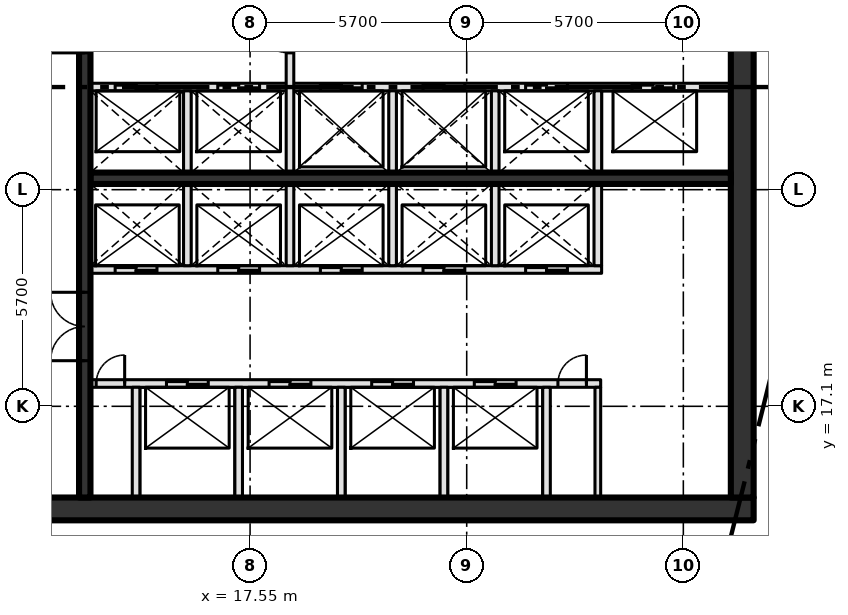
"""IFC4 building model, lengths in metres.
Left out: names, types, materials, properties, quantities, classifications, styles, units other than length and angle.
Written with IfcOpenShell. Run it as: python <this file> out.ifc"""

import sys

from ifc_helpers import new_model, si_unit, direction, frame, frame_2d, origin, place, context, subcontext, project, spatial, rectangle, extrude, element, fill, save


model = new_model("IFC4")
c1 = context("Model", 3, precision=1e-05, world=origin(), true_north=direction((0.0, 1.0)))
c2 = subcontext(c1, "Body", "Model", "MODEL_VIEW")
j1 = project(units=[si_unit("LENGTHUNIT", "METRE"), si_unit("PLANEANGLEUNIT", "RADIAN")], contexts=[c1])
p1 = place(None, origin())
s1 = spatial("IfcSite", under=j1, at=p1, CompositionType="ELEMENT")
p2 = place(p1, origin())
s2 = spatial("IfcBuilding", under=s1, at=p2, CompositionType="ELEMENT")
p3 = place(p2, frame((0.0, 0.0, 284.4)))
s3 = spatial("IfcBuildingStorey", under=s2, at=p3, CompositionType="ELEMENT", Elevation=284.4)
p4 = place(p3, frame((8.0, 14.4, -0.45), z_axis=(0.0, 0.0, 1.0), x_axis=(1.0, 0.0, 0.0)))
e1 = element("IfcWall", 1, at=p4, inside=s3, PredefinedType="SHEAR", context=c2, shape_type="SweptSolid", body=[
    extrude(rectangle(XDim=22.8, YDim=0.6, at=frame_2d((11.4, 0.0))), origin(), (0.0, 0.0, 1.0), 5.55),
])
p5 = place(p4, frame((2.3, 0.0, 0.45)))
e2 = element("IfcOpeningElement", 2, at=p5, cuts=e1, PredefinedType="OPENING", context=c2, shape_type="SweptSolid", body=[
    extrude(rectangle(XDim=1.8, YDim=2.1, at=frame_2d((0.9, 1.05))), frame((0.0, 0.31, 0.0), z_axis=(0.0, -1.0, 0.0), x_axis=(1.0, 0.0, 0.0)), (0.0, 0.0, 1.0), 0.62),
])
p6 = place(p3, frame((30.5, 14.7, -0.45), z_axis=(0.0, 0.0, 1.0), x_axis=(0.0, 1.0, 0.0)))
e3 = element("IfcWall", 3, at=p6, inside=s3, PredefinedType="SHEAR", context=c2, shape_type="SweptSolid", body=[
    extrude(rectangle(XDim=21.0, YDim=0.6, at=frame_2d((10.5, 0.0))), origin(), (0.0, 0.0, 1.0), 5.55),
])
p7 = place(p3, frame((13.35, 17.7, 0.0), z_axis=(0.0, 0.0, 1.0), x_axis=(1.0, 0.0, 0.0)))
e4 = element("IfcWall", 4, at=p7, inside=s3, PredefinedType="SOLIDWALL", context=c2, shape_type="SweptSolid", body=[
    extrude(rectangle(XDim=13.425, YDim=0.2, at=frame_2d((6.712, 0.0))), origin(), (0.0, 0.0, 1.0), 5.1),
])
p8 = place(p7, frame((2.0, 0.0, 0.0)))
e5 = element("IfcOpeningElement", 5, at=p8, cuts=e4, PredefinedType="OPENING", context=c2, shape_type="SweptSolid", body=[
    extrude(rectangle(XDim=1.1, YDim=2.1, at=frame_2d((0.55, 1.05))), frame((0.0, 0.11, 0.0), z_axis=(0.0, -1.0, 0.0), x_axis=(1.0, 0.0, 0.0)), (0.0, 0.0, 1.0), 0.22),
])
p9 = place(p7, frame((4.7, 0.0, 0.0)))
e6 = element("IfcOpeningElement", 6, at=p9, cuts=e4, PredefinedType="OPENING", context=c2, shape_type="SweptSolid", body=[
    extrude(rectangle(XDim=1.1, YDim=2.1, at=frame_2d((0.55, 1.05))), frame((0.0, 0.11, 0.0), z_axis=(0.0, -1.0, 0.0), x_axis=(1.0, 0.0, 0.0)), (0.0, 0.0, 1.0), 0.22),
])
p10 = place(p7, frame((7.4, 0.0, 0.0)))
e7 = element("IfcOpeningElement", 7, at=p10, cuts=e4, PredefinedType="OPENING", context=c2, shape_type="SweptSolid", body=[
    extrude(rectangle(XDim=1.1, YDim=2.1, at=frame_2d((0.55, 1.05))), frame((0.0, 0.11, 0.0), z_axis=(0.0, -1.0, 0.0), x_axis=(1.0, 0.0, 0.0)), (0.0, 0.0, 1.0), 0.22),
])
p11 = place(p7, frame((10.1, 0.0, 0.0)))
e8 = element("IfcOpeningElement", 8, at=p11, cuts=e4, PredefinedType="OPENING", context=c2, shape_type="SweptSolid", body=[
    extrude(rectangle(XDim=1.1, YDim=2.1, at=frame_2d((0.55, 1.05))), frame((0.0, 0.11, 0.0), z_axis=(0.0, -1.0, 0.0), x_axis=(1.0, 0.0, 0.0)), (0.0, 0.0, 1.0), 0.22),
])
p12 = place(p7, frame((0.15, 0.0, 0.0)))
e9 = element("IfcOpeningElement", 9, at=p12, cuts=e4, PredefinedType="OPENING", context=c2, shape_type="SweptSolid", body=[
    extrude(rectangle(XDim=0.75, YDim=2.1, at=frame_2d((0.375, 1.05))), frame((0.0, 0.11, 0.0), z_axis=(0.0, -1.0, 0.0), x_axis=(1.0, 0.0, 0.0)), (0.0, 0.0, 1.0), 0.22),
])
p13 = place(p7, frame((12.3, 0.0, 0.0)))
e10 = element("IfcOpeningElement", 10, at=p13, cuts=e4, PredefinedType="OPENING", context=c2, shape_type="SweptSolid", body=[
    extrude(rectangle(XDim=0.75, YDim=2.1, at=frame_2d((0.375, 1.05))), frame((0.0, 0.11, 0.0), z_axis=(0.0, -1.0, 0.0), x_axis=(1.0, 0.0, 0.0)), (0.0, 0.0, 1.0), 0.22),
])
p14 = place(p3, frame((13.35, 20.7, 0.0), z_axis=(0.0, 0.0, 1.0), x_axis=(1.0, 0.0, 0.0)))
e11 = element("IfcWall", 11, at=p14, inside=s3, PredefinedType="SOLIDWALL", context=c2, shape_type="SweptSolid", body=[
    extrude(rectangle(XDim=13.45, YDim=0.2, at=frame_2d((6.725, 0.0))), origin(), (0.0, 0.0, 1.0), 5.1),
])
p15 = place(p14, frame((0.65, 0.0, 0.0)))
e12 = element("IfcOpeningElement", 12, at=p15, cuts=e11, PredefinedType="OPENING", context=c2, shape_type="SweptSolid", body=[
    extrude(rectangle(XDim=1.1, YDim=2.1, at=frame_2d((0.55, 1.05))), frame((0.0, 0.11, 0.0), z_axis=(0.0, -1.0, 0.0), x_axis=(1.0, 0.0, 0.0)), (0.0, 0.0, 1.0), 0.22),
])
p16 = place(p14, frame((3.35, 0.0, 0.0)))
e13 = element("IfcOpeningElement", 13, at=p16, cuts=e11, PredefinedType="OPENING", context=c2, shape_type="SweptSolid", body=[
    extrude(rectangle(XDim=1.1, YDim=2.1, at=frame_2d((0.55, 1.05))), frame((0.0, 0.11, 0.0), z_axis=(0.0, -1.0, 0.0), x_axis=(1.0, 0.0, 0.0)), (0.0, 0.0, 1.0), 0.22),
])
p17 = place(p14, frame((6.05, 0.0, 0.0)))
e14 = element("IfcOpeningElement", 14, at=p17, cuts=e11, PredefinedType="OPENING", context=c2, shape_type="SweptSolid", body=[
    extrude(rectangle(XDim=1.1, YDim=2.1, at=frame_2d((0.55, 1.05))), frame((0.0, 0.11, 0.0), z_axis=(0.0, -1.0, 0.0), x_axis=(1.0, 0.0, 0.0)), (0.0, 0.0, 1.0), 0.22),
])
p18 = place(p14, frame((8.75, 0.0, 0.0)))
e15 = element("IfcOpeningElement", 15, at=p18, cuts=e11, PredefinedType="OPENING", context=c2, shape_type="SweptSolid", body=[
    extrude(rectangle(XDim=1.1, YDim=2.1, at=frame_2d((0.55, 1.05))), frame((0.0, 0.11, 0.0), z_axis=(0.0, -1.0, 0.0), x_axis=(1.0, 0.0, 0.0)), (0.0, 0.0, 1.0), 0.22),
])
p19 = place(p14, frame((11.45, 0.0, 0.0)))
e16 = element("IfcOpeningElement", 16, at=p19, cuts=e11, PredefinedType="OPENING", context=c2, shape_type="SweptSolid", body=[
    extrude(rectangle(XDim=1.1, YDim=2.1, at=frame_2d((0.55, 1.05))), frame((0.0, 0.11, 0.0), z_axis=(0.0, -1.0, 0.0), x_axis=(1.0, 0.0, 0.0)), (0.0, 0.0, 1.0), 0.22),
])
p20 = place(p3, frame((13.35, 23.1, 0.0), z_axis=(0.0, 0.0, 1.0), x_axis=(1.0, 0.0, 0.0)))
e17 = element("IfcWall", 17, at=p20, inside=s3, PredefinedType="SHEAR", context=c2, shape_type="SweptSolid", body=[
    extrude(rectangle(XDim=16.85, YDim=0.3, at=frame_2d((8.425, 0.0))), origin(), (0.0, 0.0, 1.0), 5.1),
])
p21 = place(p3, frame((13.35, 25.5, 0.0), z_axis=(0.0, 0.0, 1.0), x_axis=(1.0, 0.0, 0.0)))
e18 = element("IfcWall", 18, at=p21, inside=s3, PredefinedType="SOLIDWALL", context=c2, shape_type="SweptSolid", body=[
    extrude(rectangle(XDim=16.85, YDim=0.2, at=frame_2d((8.425, 0.0))), origin(), (0.0, 0.0, 1.0), 5.1),
])
p22 = place(p21, frame((0.65, 0.0, 0.0)))
e19 = element("IfcOpeningElement", 19, at=p22, cuts=e18, PredefinedType="OPENING", context=c2, shape_type="SweptSolid", body=[
    extrude(rectangle(XDim=1.1, YDim=2.1, at=frame_2d((0.55, 1.05))), frame((0.0, 0.11, 0.0), z_axis=(0.0, -1.0, 0.0), x_axis=(1.0, 0.0, 0.0)), (0.0, 0.0, 1.0), 0.22),
])
p23 = place(p21, frame((3.35, 0.0, 0.0)))
e20 = element("IfcOpeningElement", 20, at=p23, cuts=e18, PredefinedType="OPENING", context=c2, shape_type="SweptSolid", body=[
    extrude(rectangle(XDim=1.1, YDim=2.1, at=frame_2d((0.55, 1.05))), frame((0.0, 0.11, 0.0), z_axis=(0.0, -1.0, 0.0), x_axis=(1.0, 0.0, 0.0)), (0.0, 0.0, 1.0), 0.22),
])
p24 = place(p21, frame((6.05, 0.0, 0.0)))
e21 = element("IfcOpeningElement", 21, at=p24, cuts=e18, PredefinedType="OPENING", context=c2, shape_type="SweptSolid", body=[
    extrude(rectangle(XDim=1.1, YDim=2.1, at=frame_2d((0.55, 1.05))), frame((0.0, 0.11, 0.0), z_axis=(0.0, -1.0, 0.0), x_axis=(1.0, 0.0, 0.0)), (0.0, 0.0, 1.0), 0.22),
])
p25 = place(p21, frame((8.75, 0.0, 0.0)))
e22 = element("IfcOpeningElement", 22, at=p25, cuts=e18, PredefinedType="OPENING", context=c2, shape_type="SweptSolid", body=[
    extrude(rectangle(XDim=1.1, YDim=2.1, at=frame_2d((0.55, 1.05))), frame((0.0, 0.11, 0.0), z_axis=(0.0, -1.0, 0.0), x_axis=(1.0, 0.0, 0.0)), (0.0, 0.0, 1.0), 0.22),
])
p26 = place(p21, frame((11.45, 0.0, 0.0)))
e23 = element("IfcOpeningElement", 23, at=p26, cuts=e18, PredefinedType="OPENING", context=c2, shape_type="SweptSolid", body=[
    extrude(rectangle(XDim=1.1, YDim=2.1, at=frame_2d((0.55, 1.05))), frame((0.0, 0.11, 0.0), z_axis=(0.0, -1.0, 0.0), x_axis=(1.0, 0.0, 0.0)), (0.0, 0.0, 1.0), 0.22),
])
p27 = place(p21, frame((14.25, 0.0, 0.0)))
e24 = element("IfcOpeningElement", 24, at=p27, cuts=e18, PredefinedType="OPENING", context=c2, shape_type="SweptSolid", body=[
    extrude(rectangle(XDim=1.1, YDim=2.1, at=frame_2d((0.55, 1.05))), frame((0.0, 0.11, 0.0), z_axis=(0.0, -1.0, 0.0), x_axis=(1.0, 0.0, 0.0)), (0.0, 0.0, 1.0), 0.22),
])
p28 = place(p3, frame((13.2, 14.7, 0.0), z_axis=(0.0, 0.0, 1.0), x_axis=(0.0, 1.0, 0.0)))
e25 = element("IfcWall", 25, at=p28, inside=s3, PredefinedType="SHEAR", context=c2, shape_type="SweptSolid", body=[
    extrude(rectangle(XDim=21.0, YDim=0.3, at=frame_2d((10.5, 0.0))), origin(), (0.0, 0.0, 1.0), 5.1),
])
p29 = place(p28, frame((3.6, 0.0, 0.0)))
e26 = element("IfcOpeningElement", 26, at=p29, cuts=e25, PredefinedType="OPENING", context=c2, shape_type="SweptSolid", body=[
    extrude(rectangle(XDim=1.8, YDim=2.1, at=frame_2d((0.9, 1.05))), frame((0.0, 0.16, 0.0), z_axis=(0.0, -1.0, 0.0), x_axis=(1.0, 0.0, 0.0)), (0.0, 0.0, 1.0), 0.32),
])
p30 = place(p28, frame((11.7, 0.0, 0.0)))
e27 = element("IfcOpeningElement", 27, at=p30, cuts=e25, PredefinedType="OPENING", context=c2, shape_type="SweptSolid", body=[
    extrude(rectangle(XDim=1.2, YDim=2.1, at=frame_2d((0.6, 1.05))), frame((0.0, 0.16, 0.0), z_axis=(0.0, -1.0, 0.0), x_axis=(1.0, 0.0, 0.0)), (0.0, 0.0, 1.0), 0.32),
])
p31 = place(p3, frame((14.55, 14.7, 0.0), z_axis=(0.0, 0.0, 1.0), x_axis=(0.0, 1.0, 0.0)))
e28 = element("IfcWall", 28, at=p31, inside=s3, PredefinedType="SOLIDWALL", context=c2, shape_type="SweptSolid", body=[
    extrude(rectangle(XDim=2.9, YDim=0.2, at=frame_2d((1.45, 0.0))), origin(), (0.0, 0.0, 1.0), 5.1),
])
p32 = place(p3, frame((15.9, 20.8, 0.0), z_axis=(0.0, 0.0, 1.0), x_axis=(0.0, 1.0, 0.0)))
e29 = element("IfcWall", 29, at=p32, inside=s3, PredefinedType="SOLIDWALL", context=c2, shape_type="SweptSolid", body=[
    extrude(rectangle(XDim=4.6, YDim=0.2, at=frame_2d((2.3, 0.0))), origin(), (0.0, 0.0, 1.0), 5.1),
])
p33 = place(p3, frame((17.25, 14.7, 0.0), z_axis=(0.0, 0.0, 1.0), x_axis=(0.0, 1.0, 0.0)))
e30 = element("IfcWall", 30, at=p33, inside=s3, PredefinedType="SOLIDWALL", context=c2, shape_type="SweptSolid", body=[
    extrude(rectangle(XDim=2.9, YDim=0.2, at=frame_2d((1.45, 0.0))), origin(), (0.0, 0.0, 1.0), 5.1),
])
p34 = place(p3, frame((18.6, 20.8, 0.0), z_axis=(0.0, 0.0, 1.0), x_axis=(0.0, 1.0, 0.0)))
e31 = element("IfcWall", 31, at=p34, inside=s3, PredefinedType="SOLIDWALL", context=c2, shape_type="SweptSolid", body=[
    extrude(rectangle(XDim=7.6, YDim=0.2, at=frame_2d((3.8, 0.0))), origin(), (0.0, 0.0, 1.0), 5.1),
])
p35 = place(p34, frame((5.6, 0.0, 0.0)))
e32 = element("IfcOpeningElement", 32, at=p35, cuts=e31, PredefinedType="OPENING", context=c2, shape_type="SweptSolid", body=[
    extrude(rectangle(XDim=1.2, YDim=2.1, at=frame_2d((0.6, 1.05))), frame((0.0, 0.11, 0.0), z_axis=(0.0, -1.0, 0.0), x_axis=(1.0, 0.0, 0.0)), (0.0, 0.0, 1.0), 0.22),
])
p36 = place(p3, frame((19.95, 14.7, 0.0), z_axis=(0.0, 0.0, 1.0), x_axis=(0.0, 1.0, 0.0)))
e33 = element("IfcWall", 33, at=p36, inside=s3, PredefinedType="SOLIDWALL", context=c2, shape_type="SweptSolid", body=[
    extrude(rectangle(XDim=2.9, YDim=0.2, at=frame_2d((1.45, 0.0))), origin(), (0.0, 0.0, 1.0), 5.1),
])
p37 = place(p3, frame((21.3, 20.8, 0.0), z_axis=(0.0, 0.0, 1.0), x_axis=(0.0, 1.0, 0.0)))
e34 = element("IfcWall", 34, at=p37, inside=s3, PredefinedType="SOLIDWALL", context=c2, shape_type="SweptSolid", body=[
    extrude(rectangle(XDim=4.6, YDim=0.2, at=frame_2d((2.3, 0.0))), origin(), (0.0, 0.0, 1.0), 5.1),
])
p38 = place(p3, frame((22.65, 14.7, 0.0), z_axis=(0.0, 0.0, 1.0), x_axis=(0.0, 1.0, 0.0)))
e35 = element("IfcWall", 35, at=p38, inside=s3, PredefinedType="SOLIDWALL", context=c2, shape_type="SweptSolid", body=[
    extrude(rectangle(XDim=2.9, YDim=0.2, at=frame_2d((1.45, 0.0))), origin(), (0.0, 0.0, 1.0), 5.1),
])
p39 = place(p3, frame((24.0, 20.8, 0.0), z_axis=(0.0, 0.0, 1.0), x_axis=(0.0, 1.0, 0.0)))
e36 = element("IfcWall", 36, at=p39, inside=s3, PredefinedType="SOLIDWALL", context=c2, shape_type="SweptSolid", body=[
    extrude(rectangle(XDim=4.6, YDim=0.2, at=frame_2d((2.3, 0.0))), origin(), (0.0, 0.0, 1.0), 5.1),
])
p40 = place(p3, frame((25.35, 14.7, 0.0), z_axis=(0.0, 0.0, 1.0), x_axis=(0.0, 1.0, 0.0)))
e37 = element("IfcWall", 37, at=p40, inside=s3, PredefinedType="SOLIDWALL", context=c2, shape_type="SweptSolid", body=[
    extrude(rectangle(XDim=2.9, YDim=0.2, at=frame_2d((1.45, 0.0))), origin(), (0.0, 0.0, 1.0), 5.1),
])
p41 = place(p3, frame((26.7, 14.7, 0.0), z_axis=(0.0, 0.0, 1.0), x_axis=(0.0, 1.0, 0.0)))
e38 = element("IfcWall", 38, at=p41, inside=s3, PredefinedType="PARTITIONING", context=c2, shape_type="SweptSolid", body=[
    extrude(rectangle(XDim=2.9, YDim=0.15, at=frame_2d((1.45, 0.0))), origin(), (0.0, 0.0, 1.0), 5.1),
])
p42 = place(p3, frame((26.7, 20.8, 0.0), z_axis=(0.0, 0.0, 1.0), x_axis=(0.0, 1.0, 0.0)))
e39 = element("IfcWall", 39, at=p42, inside=s3, PredefinedType="SOLIDWALL", context=c2, shape_type="SweptSolid", body=[
    extrude(rectangle(XDim=4.6, YDim=0.2, at=frame_2d((2.3, 0.0))), origin(), (0.0, 0.0, 1.0), 5.1),
])
p43 = place(p8, origin())
e40 = element("IfcDoor", 40, at=p43, inside=s3, OperationType="SLIDING_TO_LEFT", PredefinedType="DOOR", context=c2, shape_type="SweptSolid", body=[
    extrude(rectangle(XDim=1.1, YDim=2.1, at=frame_2d((0.55, 1.05))), frame((0.0, 0.025, 0.0), z_axis=(0.0, -1.0, 0.0), x_axis=(1.0, 0.0, 0.0)), (0.0, 0.0, 1.0), 0.05),
])
fill(e5, e40)
p44 = place(p9, origin())
e41 = element("IfcDoor", 41, at=p44, inside=s3, OperationType="SLIDING_TO_LEFT", PredefinedType="DOOR", context=c2, shape_type="SweptSolid", body=[
    extrude(rectangle(XDim=1.1, YDim=2.1, at=frame_2d((0.55, 1.05))), frame((0.0, 0.025, 0.0), z_axis=(0.0, -1.0, 0.0), x_axis=(1.0, 0.0, 0.0)), (0.0, 0.0, 1.0), 0.05),
])
fill(e6, e41)
p45 = place(p10, origin())
e42 = element("IfcDoor", 42, at=p45, inside=s3, OperationType="SLIDING_TO_LEFT", PredefinedType="DOOR", context=c2, shape_type="SweptSolid", body=[
    extrude(rectangle(XDim=1.1, YDim=2.1, at=frame_2d((0.55, 1.05))), frame((0.0, 0.025, 0.0), z_axis=(0.0, -1.0, 0.0), x_axis=(1.0, 0.0, 0.0)), (0.0, 0.0, 1.0), 0.05),
])
fill(e7, e42)
p46 = place(p11, origin())
e43 = element("IfcDoor", 43, at=p46, inside=s3, OperationType="SLIDING_TO_LEFT", PredefinedType="DOOR", context=c2, shape_type="SweptSolid", body=[
    extrude(rectangle(XDim=1.1, YDim=2.1, at=frame_2d((0.55, 1.05))), frame((0.0, 0.025, 0.0), z_axis=(0.0, -1.0, 0.0), x_axis=(1.0, 0.0, 0.0)), (0.0, 0.0, 1.0), 0.05),
])
fill(e8, e43)
p47 = place(p15, origin())
e44 = element("IfcDoor", 44, at=p47, inside=s3, OperationType="SLIDING_TO_LEFT", PredefinedType="DOOR", context=c2, shape_type="SweptSolid", body=[
    extrude(rectangle(XDim=1.1, YDim=2.1, at=frame_2d((0.55, 1.05))), frame((0.0, 0.025, 0.0), z_axis=(0.0, -1.0, 0.0), x_axis=(1.0, 0.0, 0.0)), (0.0, 0.0, 1.0), 0.05),
])
fill(e12, e44)
p48 = place(p16, origin())
e45 = element("IfcDoor", 45, at=p48, inside=s3, OperationType="SLIDING_TO_LEFT", PredefinedType="DOOR", context=c2, shape_type="SweptSolid", body=[
    extrude(rectangle(XDim=1.1, YDim=2.1, at=frame_2d((0.55, 1.05))), frame((0.0, 0.025, 0.0), z_axis=(0.0, -1.0, 0.0), x_axis=(1.0, 0.0, 0.0)), (0.0, 0.0, 1.0), 0.05),
])
fill(e13, e45)
p49 = place(p17, origin())
e46 = element("IfcDoor", 46, at=p49, inside=s3, OperationType="SLIDING_TO_LEFT", PredefinedType="DOOR", context=c2, shape_type="SweptSolid", body=[
    extrude(rectangle(XDim=1.1, YDim=2.1, at=frame_2d((0.55, 1.05))), frame((0.0, 0.025, 0.0), z_axis=(0.0, -1.0, 0.0), x_axis=(1.0, 0.0, 0.0)), (0.0, 0.0, 1.0), 0.05),
])
fill(e14, e46)
p50 = place(p18, origin())
e47 = element("IfcDoor", 47, at=p50, inside=s3, OperationType="SLIDING_TO_LEFT", PredefinedType="DOOR", context=c2, shape_type="SweptSolid", body=[
    extrude(rectangle(XDim=1.1, YDim=2.1, at=frame_2d((0.55, 1.05))), frame((0.0, 0.025, 0.0), z_axis=(0.0, -1.0, 0.0), x_axis=(1.0, 0.0, 0.0)), (0.0, 0.0, 1.0), 0.05),
])
fill(e15, e47)
p51 = place(p19, origin())
e48 = element("IfcDoor", 48, at=p51, inside=s3, OperationType="SLIDING_TO_LEFT", PredefinedType="DOOR", context=c2, shape_type="SweptSolid", body=[
    extrude(rectangle(XDim=1.1, YDim=2.1, at=frame_2d((0.55, 1.05))), frame((0.0, 0.025, 0.0), z_axis=(0.0, -1.0, 0.0), x_axis=(1.0, 0.0, 0.0)), (0.0, 0.0, 1.0), 0.05),
])
fill(e16, e48)
p52 = place(p22, origin())
e49 = element("IfcDoor", 49, at=p52, inside=s3, OperationType="SLIDING_TO_LEFT", PredefinedType="DOOR", context=c2, shape_type="SweptSolid", body=[
    extrude(rectangle(XDim=1.1, YDim=2.1, at=frame_2d((0.55, 1.05))), frame((0.0, 0.025, 0.0), z_axis=(0.0, -1.0, 0.0), x_axis=(1.0, 0.0, 0.0)), (0.0, 0.0, 1.0), 0.05),
])
fill(e19, e49)
p53 = place(p23, origin())
e50 = element("IfcDoor", 50, at=p53, inside=s3, OperationType="SLIDING_TO_LEFT", PredefinedType="DOOR", context=c2, shape_type="SweptSolid", body=[
    extrude(rectangle(XDim=1.1, YDim=2.1, at=frame_2d((0.55, 1.05))), frame((0.0, 0.025, 0.0), z_axis=(0.0, -1.0, 0.0), x_axis=(1.0, 0.0, 0.0)), (0.0, 0.0, 1.0), 0.05),
])
fill(e20, e50)
p54 = place(p24, origin())
e51 = element("IfcDoor", 51, at=p54, inside=s3, OperationType="SLIDING_TO_LEFT", PredefinedType="DOOR", context=c2, shape_type="SweptSolid", body=[
    extrude(rectangle(XDim=1.1, YDim=2.1, at=frame_2d((0.55, 1.05))), frame((0.0, 0.025, 0.0), z_axis=(0.0, -1.0, 0.0), x_axis=(1.0, 0.0, 0.0)), (0.0, 0.0, 1.0), 0.05),
])
fill(e21, e51)
p55 = place(p25, origin())
e52 = element("IfcDoor", 52, at=p55, inside=s3, OperationType="SLIDING_TO_LEFT", PredefinedType="DOOR", context=c2, shape_type="SweptSolid", body=[
    extrude(rectangle(XDim=1.1, YDim=2.1, at=frame_2d((0.55, 1.05))), frame((0.0, 0.025, 0.0), z_axis=(0.0, -1.0, 0.0), x_axis=(1.0, 0.0, 0.0)), (0.0, 0.0, 1.0), 0.05),
])
fill(e22, e52)
p56 = place(p26, origin())
e53 = element("IfcDoor", 53, at=p56, inside=s3, OperationType="SLIDING_TO_LEFT", PredefinedType="DOOR", context=c2, shape_type="SweptSolid", body=[
    extrude(rectangle(XDim=1.1, YDim=2.1, at=frame_2d((0.55, 1.05))), frame((0.0, 0.025, 0.0), z_axis=(0.0, -1.0, 0.0), x_axis=(1.0, 0.0, 0.0)), (0.0, 0.0, 1.0), 0.05),
])
fill(e23, e53)
p57 = place(p27, origin())
e54 = element("IfcDoor", 54, at=p57, inside=s3, OperationType="SLIDING_TO_LEFT", PredefinedType="DOOR", context=c2, shape_type="SweptSolid", body=[
    extrude(rectangle(XDim=1.1, YDim=2.1, at=frame_2d((0.55, 1.05))), frame((0.0, 0.025, 0.0), z_axis=(0.0, -1.0, 0.0), x_axis=(1.0, 0.0, 0.0)), (0.0, 0.0, 1.0), 0.05),
])
fill(e24, e54)
p58 = place(p12, origin())
e55 = element("IfcDoor", 55, at=p58, inside=s3, OperationType="SINGLE_SWING_RIGHT", PredefinedType="DOOR", context=c2, shape_type="SweptSolid", body=[
    extrude(rectangle(XDim=0.75, YDim=2.1, at=frame_2d((0.375, 1.05))), frame((0.0, 0.025, 0.0), z_axis=(0.0, -1.0, 0.0), x_axis=(1.0, 0.0, 0.0)), (0.0, 0.0, 1.0), 0.05),
])
fill(e9, e55)
p59 = place(p13, origin())
e56 = element("IfcDoor", 56, at=p59, inside=s3, OperationType="SINGLE_SWING_RIGHT", PredefinedType="DOOR", context=c2, shape_type="SweptSolid", body=[
    extrude(rectangle(XDim=0.75, YDim=2.1, at=frame_2d((0.375, 1.05))), frame((0.0, 0.025, 0.0), z_axis=(0.0, -1.0, 0.0), x_axis=(1.0, 0.0, 0.0)), (0.0, 0.0, 1.0), 0.05),
])
fill(e10, e56)
p60 = place(p29, origin())
e57 = element("IfcDoor", 57, at=p60, inside=s3, OperationType="DOUBLE_DOOR_SINGLE_SWING", PredefinedType="DOOR", context=c2, shape_type="SweptSolid", body=[
    extrude(rectangle(XDim=1.8, YDim=2.1, at=frame_2d((0.9, 1.05))), frame((0.0, 0.025, 0.0), z_axis=(0.0, -1.0, 0.0), x_axis=(1.0, 0.0, 0.0)), (0.0, 0.0, 1.0), 0.05),
])
fill(e26, e57)
save(model, sys.argv[1])
